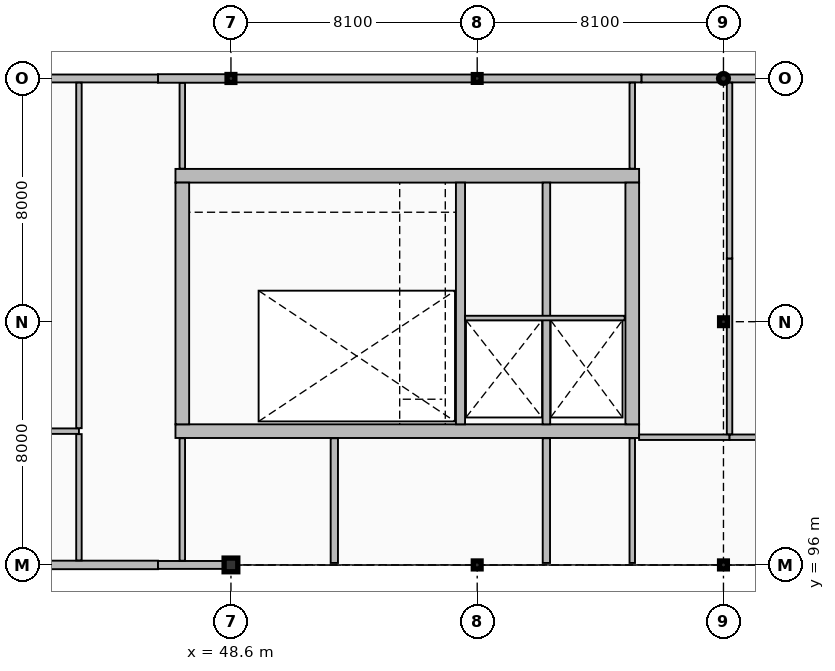
"""IFC4 building model, lengths in metres.
Left out: names, types, materials, properties, quantities, classifications, styles, units other than length and angle.
Written with IfcOpenShell. Run it as: python <this file> out.ifc"""

import sys

from ifc_helpers import new_model, si_unit, direction, frame, frame_2d, origin, origin_2d, place, context, subcontext, project, spatial, rectangle, hollow_rectangle, hollow_circle, i_section, extrude, element, fill, save


model = new_model("IFC4")
c1 = context("Model", 3, precision=1e-05, world=origin(), true_north=direction((0.0, 1.0)))
c2 = subcontext(c1, "Body", "Model", "MODEL_VIEW")
j1 = project(units=[si_unit("LENGTHUNIT", "METRE"), si_unit("PLANEANGLEUNIT", "RADIAN")], contexts=[c1])
p1 = place(None, origin())
s1 = spatial("IfcSite", under=j1, at=p1, CompositionType="ELEMENT")
p2 = place(p1, origin())
s2 = spatial("IfcBuilding", under=s1, at=p2, CompositionType="ELEMENT")
p3 = place(p2, frame((0.0, 0.0, 24.9)))
s3 = spatial("IfcBuildingStorey", under=s2, at=p3, CompositionType="ELEMENT", Elevation=24.9)
p4 = place(p3, frame((46.775, 100.4, 0.0), z_axis=(0.0, 0.0, 1.0), x_axis=(1.0, 0.0, 0.0)))
e1 = element("IfcWall", 1, at=p4, inside=s3, PredefinedType="SHEAR", context=c2, shape_type="SweptSolid", body=[
    extrude(rectangle(XDim=15.25, YDim=0.45, at=frame_2d((7.625, 0.0))), origin(), (0.0, 0.0, 1.0), 4.2),
])
p5 = place(p4, frame((0.975, 0.0, 0.0)))
e2 = element("IfcOpeningElement", 2, at=p5, cuts=e1, PredefinedType="OPENING", context=c2, shape_type="SweptSolid", body=[
    extrude(rectangle(XDim=1.15, YDim=2.25, at=frame_2d((0.575, 1.125))), frame((0.0, 0.235, 0.0), z_axis=(0.0, -1.0, 0.0), x_axis=(1.0, 0.0, 0.0)), (0.0, 0.0, 1.0), 0.47),
])
p6 = place(p4, frame((10.258, 0.0, 0.0)))
e3 = element("IfcOpeningElement", 3, at=p6, cuts=e1, PredefinedType="OPENING", context=c2, shape_type="SweptSolid", body=[
    extrude(rectangle(XDim=1.1, YDim=2.2, at=frame_2d((0.55, 1.1))), frame((0.0, 0.235, 0.0), z_axis=(0.0, -1.0, 0.0), x_axis=(1.0, 0.0, 0.0)), (0.0, 0.0, 1.0), 0.47),
])
p7 = place(p4, frame((12.972, 0.0, 0.0)))
e4 = element("IfcOpeningElement", 4, at=p7, cuts=e1, PredefinedType="OPENING", context=c2, shape_type="SweptSolid", body=[
    extrude(rectangle(XDim=1.1, YDim=2.2, at=frame_2d((0.55, 1.1))), frame((0.0, 0.235, 0.0), z_axis=(0.0, -1.0, 0.0), x_axis=(1.0, 0.0, 0.0)), (0.0, 0.0, 1.0), 0.47),
])
p8 = place(p3, frame((46.775, 108.8, 0.0), z_axis=(0.0, 0.0, 1.0), x_axis=(1.0, 0.0, 0.0)))
e5 = element("IfcWall", 5, at=p8, inside=s3, PredefinedType="SHEAR", context=c2, shape_type="SweptSolid", body=[
    extrude(rectangle(XDim=15.25, YDim=0.45, at=frame_2d((7.625, 0.0))), origin(), (0.0, 0.0, 1.0), 4.2),
])
for number, where, z_axis, x_axis in (
    (6, (47.0, 100.625, 0.0), (0.0, 0.0, 1.0), (0.0, 1.0, 0.0)),
    (7, (61.8, 100.625, 0.0), (0.0, 0.0, 1.0), (0.0, 1.0, 0.0)),
):
    element("IfcWall", number, at=place(p3, frame(where, z_axis=z_axis, x_axis=x_axis)), inside=s3, PredefinedType="SHEAR", context=c2, shape_type="SweptSolid", body=[
        extrude(rectangle(XDim=7.95, YDim=0.45, at=frame_2d((3.975, 0.0))), origin(), (0.0, 0.0, 1.0), 4.2),
    ])
p9 = place(p3, frame((56.15, 100.625, 0.0), z_axis=(0.0, 0.0, 1.0), x_axis=(0.0, 1.0, 0.0)))
e8 = element("IfcWall", 8, at=p9, inside=s3, PredefinedType="SHEAR", context=c2, shape_type="SweptSolid", body=[
    extrude(rectangle(XDim=7.95, YDim=0.3, at=frame_2d((3.975, 0.0))), origin(), (0.0, 0.0, 1.0), 4.2),
])
p10 = place(p3, frame((58.975, 100.625, 0.0), z_axis=(0.0, 0.0, 1.0), x_axis=(0.0, 1.0, 0.0)))
e9 = element("IfcWall", 9, at=p10, inside=s3, PredefinedType="SHEAR", context=c2, shape_type="SweptSolid", body=[
    extrude(rectangle(XDim=7.95, YDim=0.25, at=frame_2d((3.975, 0.0))), origin(), (0.0, 0.0, 1.0), 4.2),
])
p11 = place(p3, frame((48.6, 96.0, 0.0), z_axis=(0.0, 0.0, 1.0), x_axis=(1.0, 0.0, 0.0)))
e10 = element("IfcColumn", 10, at=p11, inside=s3, PredefinedType="COLUMN", context=c2, shape_type="SweptSolid", body=[
    extrude(rectangle(XDim=0.45, YDim=0.45, at=origin_2d()), origin(), (0.0, 0.0, 1.0), 4.2),
])
for number, where, z_axis, x_axis in (
    (11, (48.6, 112.0, 0.0), (0.0, 0.0, 1.0), (1.0, 0.0, 0.0)),
    (12, (56.7, 96.0, 0.0), (0.0, 0.0, 1.0), (1.0, 0.0, 0.0)),
):
    element("IfcColumn", number, at=place(p3, frame(where, z_axis=z_axis, x_axis=x_axis)), inside=s3, PredefinedType="COLUMN", context=c2, shape_type="SweptSolid", body=[
        extrude(i_section(OverallWidth=0.256, OverallDepth=0.26, WebThickness=0.011, FlangeThickness=0.017, FilletRadius=0.013, at=origin_2d()), origin(), (0.0, 0.0, 1.0), 4.2),
    ])
p12 = place(p3, frame((56.7, 112.0, 0.0), z_axis=(0.0, 0.0, 1.0), x_axis=(1.0, 0.0, 0.0)))
e13 = element("IfcColumn", 13, at=p12, inside=s3, PredefinedType="COLUMN", context=c2, shape_type="SweptSolid", body=[
    extrude(hollow_rectangle(XDim=0.254, YDim=0.254, WallThickness=0.013, InnerFilletRadius=0.013, OuterFilletRadius=0.025, at=origin_2d()), origin(), (0.0, 0.0, 1.0), 4.2),
])
p13 = place(p3, frame((64.8, 96.0, 0.0), z_axis=(0.0, 0.0, 1.0), x_axis=(1.0, 0.0, 0.0)))
e14 = element("IfcColumn", 14, at=p13, inside=s3, PredefinedType="COLUMN", context=c2, shape_type="SweptSolid", body=[
    extrude(i_section(OverallWidth=0.256, OverallDepth=0.26, WebThickness=0.011, FlangeThickness=0.017, FilletRadius=0.013, at=origin_2d()), origin(), (0.0, 0.0, 1.0), 4.2),
])
p14 = place(p3, frame((64.8, 104.0, 0.0), z_axis=(0.0, 0.0, 1.0), x_axis=(1.0, 0.0, 0.0)))
e15 = element("IfcColumn", 15, at=p14, inside=s3, PredefinedType="COLUMN", context=c2, shape_type="SweptSolid", body=[
    extrude(hollow_rectangle(XDim=0.254, YDim=0.254, WallThickness=0.013, InnerFilletRadius=0.013, OuterFilletRadius=0.025, at=origin_2d()), origin(), (0.0, 0.0, 1.0), 4.2),
])
p15 = place(p3, frame((64.8, 112.0, 0.0), z_axis=(0.0, 0.0, 1.0), x_axis=(1.0, 0.0, 0.0)))
e16 = element("IfcColumn", 16, at=p15, inside=s3, PredefinedType="COLUMN", context=c2, shape_type="SweptSolid", body=[
    extrude(hollow_circle(Radius=0.162, WallThickness=0.013, at=origin_2d()), origin(), (0.0, 0.0, 1.0), 4.2),
])
p16 = place(p3, frame((40.68, 96.0, 0.0), z_axis=(0.0, 0.0, 1.0), x_axis=(1.0, 0.0, 0.0)))
e17 = element("IfcWall", 17, at=p16, inside=s3, PredefinedType="SOLIDWALL", context=c2, shape_type="SweptSolid", body=[
    extrude(rectangle(XDim=5.52, YDim=0.28, at=frame_2d((2.76, 0.0))), origin(), (0.0, 0.0, 1.0), 3.402),
])
p17 = place(p3, frame((46.2, 96.0, 0.0), z_axis=(0.0, 0.0, 1.0), x_axis=(1.0, 0.0, 0.0)))
e18 = element("IfcWall", 18, at=p17, inside=s3, PredefinedType="SOLIDWALL", context=c2, shape_type="SweptSolid", body=[
    extrude(rectangle(XDim=2.22, YDim=0.26, at=frame_2d((1.11, 0.0))), origin(), (0.0, 0.0, 1.0), 3.402),
])
p18 = place(p3, frame((75.6, 112.0, 0.0), z_axis=(0.0, 0.0, 1.0), x_axis=(-1.0, 0.0, 0.0)))
e19 = element("IfcWall", 19, at=p18, inside=s3, PredefinedType="SOLIDWALL", context=c2, shape_type="SweptSolid", body=[
    extrude(rectangle(XDim=13.5, YDim=0.26, at=frame_2d((6.75, 0.0))), origin(), (0.0, 0.0, 1.0), 3.302),
])
p19 = place(p18, frame((5.4, 0.0, 0.95)))
e20 = element("IfcOpeningElement", 20, at=p19, cuts=e19, PredefinedType="OPENING", context=c2, shape_type="SweptSolid", body=[
    extrude(rectangle(XDim=3.15, YDim=1.6, at=frame_2d((1.575, 0.8))), frame((0.0, 0.14, 0.0), z_axis=(0.0, -1.0, 0.0), x_axis=(1.0, 0.0, 0.0)), (0.0, 0.0, 1.0), 0.28),
])
p20 = place(p3, frame((62.1, 112.0, 0.0), z_axis=(0.0, 0.0, 1.0), x_axis=(-1.0, 0.0, 0.0)))
e21 = element("IfcWall", 21, at=p20, inside=s3, PredefinedType="SOLIDWALL", context=c2, shape_type="SweptSolid", body=[
    extrude(rectangle(XDim=13.5, YDim=0.26, at=frame_2d((6.75, 0.0))), origin(), (0.0, 0.0, 1.0), 3.402),
])
p21 = place(p20, frame((7.2, 0.0, 0.95)))
e22 = element("IfcOpeningElement", 22, at=p21, cuts=e21, PredefinedType="OPENING", context=c2, shape_type="SweptSolid", body=[
    extrude(rectangle(XDim=3.6, YDim=1.8, at=frame_2d((1.8, 0.9))), frame((0.0, 0.14, 0.0), z_axis=(0.0, -1.0, 0.0), x_axis=(1.0, 0.0, 0.0)), (0.0, 0.0, 1.0), 0.28),
])
p22 = place(p3, frame((48.6, 112.0, 0.0), z_axis=(0.0, 0.0, 1.0), x_axis=(-1.0, 0.0, 0.0)))
e23 = element("IfcWall", 23, at=p22, inside=s3, PredefinedType="SOLIDWALL", context=c2, shape_type="SweptSolid", body=[
    extrude(rectangle(XDim=2.4, YDim=0.28, at=frame_2d((1.2, 0.0))), origin(), (0.0, 0.0, 1.0), 3.489),
])
p23 = place(p3, frame((46.2, 112.0, 0.0), z_axis=(0.0, 0.0, 1.0), x_axis=(-1.0, 0.0, 0.0)))
e24 = element("IfcWall", 24, at=p23, inside=s3, PredefinedType="SOLIDWALL", context=c2, shape_type="SweptSolid", body=[
    extrude(rectangle(XDim=5.7, YDim=0.26, at=frame_2d((2.85, 0.0))), origin(), (0.0, 0.0, 1.0), 3.489),
])
p24 = place(p23, frame((3.6, 0.0, 0.95)))
e25 = element("IfcOpeningElement", 25, at=p24, cuts=e24, PredefinedType="OPENING", context=c2, shape_type="SweptSolid", body=[
    extrude(rectangle(XDim=0.6, YDim=1.8, at=frame_2d((0.3, 0.9))), frame((0.0, 0.14, 0.0), z_axis=(0.0, -1.0, 0.0), x_axis=(1.0, 0.0, 0.0)), (0.0, 0.0, 1.0), 0.28),
])
p25 = place(p3, frame((56.3, 104.12, 0.0), z_axis=(0.0, 0.0, 1.0), x_axis=(1.0, 0.0, 0.0)))
e26 = element("IfcWall", 26, at=p25, inside=s3, PredefinedType="PARTITIONING", context=c2, shape_type="SweptSolid", body=[
    extrude(rectangle(XDim=5.25, YDim=0.15, at=frame_2d((2.625, 0.0))), origin(), (0.0, 0.0, 1.0), 3.96),
])
p26 = place(p3, frame((39.6, 100.4, 0.0), z_axis=(0.0, 0.0, 1.0), x_axis=(1.0, 0.0, 0.0)))
e27 = element("IfcWall", 27, at=p26, inside=s3, PredefinedType="PARTITIONING", context=c2, shape_type="SweptSolid", body=[
    extrude(rectangle(XDim=4.0, YDim=0.18, at=frame_2d((2.0, 0.0))), origin(), (0.0, 0.0, 1.0), 3.96),
])
p27 = place(p3, frame((62.025, 100.2, 0.0), z_axis=(0.0, 0.0, 1.0), x_axis=(1.0, 0.0, 0.0)))
e28 = element("IfcWall", 28, at=p27, inside=s3, PredefinedType="PARTITIONING", context=c2, shape_type="SweptSolid", body=[
    extrude(rectangle(XDim=2.975, YDim=0.18, at=frame_2d((1.488, 0.0))), origin(), (0.0, 0.0, 1.0), 3.96),
])
p28 = place(p27, frame((0.887, 0.0, 0.0)))
e29 = element("IfcOpeningElement", 29, at=p28, cuts=e28, PredefinedType="OPENING", context=c2, shape_type="SweptSolid", body=[
    extrude(rectangle(XDim=1.2, YDim=2.2, at=frame_2d((0.6, 1.1))), frame((0.0, 0.1, 0.0), z_axis=(0.0, -1.0, 0.0), x_axis=(1.0, 0.0, 0.0)), (0.0, 0.0, 1.0), 0.2),
])
p29 = place(p3, frame((65.0, 100.2, 0.0), z_axis=(0.0, 0.0, 1.0), x_axis=(1.0, 0.0, 0.0)))
e30 = element("IfcWall", 30, at=p29, inside=s3, PredefinedType="PARTITIONING", context=c2, shape_type="SweptSolid", body=[
    extrude(rectangle(XDim=7.1, YDim=0.18, at=frame_2d((3.55, 0.0))), origin(), (0.0, 0.0, 1.0), 3.96),
])
p30 = place(p29, frame((3.0, 0.0, 0.0)))
e31 = element("IfcOpeningElement", 31, at=p30, cuts=e30, PredefinedType="OPENING", context=c2, shape_type="SweptSolid", body=[
    extrude(rectangle(XDim=1.1, YDim=2.3, at=frame_2d((0.55, 1.15))), frame((0.0, 0.1, 0.0), z_axis=(0.0, -1.0, 0.0), x_axis=(1.0, 0.0, 0.0)), (0.0, 0.0, 1.0), 0.2),
])
p31 = place(p3, frame((43.6, 96.148, 0.0), z_axis=(0.0, 0.0, 1.0), x_axis=(0.0, 1.0, 0.0)))
e32 = element("IfcWall", 32, at=p31, inside=s3, PredefinedType="PARTITIONING", context=c2, shape_type="SweptSolid", body=[
    extrude(rectangle(XDim=4.154, YDim=0.18, at=frame_2d((2.077, 0.0))), origin(), (0.0, 0.0, 1.0), 3.96),
])
p32 = place(p31, frame((1.527, 0.0, 0.0)))
e33 = element("IfcOpeningElement", 33, at=p32, cuts=e32, PredefinedType="OPENING", context=c2, shape_type="SweptSolid", body=[
    extrude(rectangle(XDim=1.1, YDim=2.2, at=frame_2d((0.55, 1.1))), frame((0.0, 0.1, 0.0), z_axis=(0.0, -1.0, 0.0), x_axis=(1.0, 0.0, 0.0)), (0.0, 0.0, 1.0), 0.2),
])
p33 = place(p3, frame((43.6, 100.498, 0.0), z_axis=(0.0, 0.0, 1.0), x_axis=(0.0, 1.0, 0.0)))
e34 = element("IfcWall", 34, at=p33, inside=s3, PredefinedType="PARTITIONING", context=c2, shape_type="SweptSolid", body=[
    extrude(rectangle(XDim=11.364, YDim=0.18, at=frame_2d((5.682, 0.0))), origin(), (0.0, 0.0, 1.0), 3.96),
])
p34 = place(p33, frame((5.182, 0.0, 0.0)))
e35 = element("IfcOpeningElement", 35, at=p34, cuts=e34, PredefinedType="OPENING", context=c2, shape_type="SweptSolid", body=[
    extrude(rectangle(XDim=1.0, YDim=2.2, at=frame_2d((0.5, 1.1))), frame((0.0, 0.1, 0.0), z_axis=(0.0, -1.0, 0.0), x_axis=(1.0, 0.0, 0.0)), (0.0, 0.0, 1.0), 0.2),
])
p35 = place(p3, frame((47.0, 96.138, 0.0), z_axis=(0.0, 0.0, 1.0), x_axis=(0.0, 1.0, 0.0)))
e36 = element("IfcWall", 36, at=p35, inside=s3, PredefinedType="PARTITIONING", context=c2, shape_type="SweptSolid", body=[
    extrude(rectangle(XDim=4.029, YDim=0.18, at=frame_2d((2.015, 0.0))), origin(), (0.0, 0.0, 1.0), 3.96),
])
p36 = place(p35, frame((1.465, 0.0, 0.0)))
e37 = element("IfcOpeningElement", 37, at=p36, cuts=e36, PredefinedType="OPENING", context=c2, shape_type="SweptSolid", body=[
    extrude(rectangle(XDim=1.1, YDim=2.2, at=frame_2d((0.55, 1.1))), frame((0.0, 0.1, 0.0), z_axis=(0.0, -1.0, 0.0), x_axis=(1.0, 0.0, 0.0)), (0.0, 0.0, 1.0), 0.2),
])
p37 = place(p3, frame((47.0, 109.033, 0.0), z_axis=(0.0, 0.0, 1.0), x_axis=(0.0, 1.0, 0.0)))
e38 = element("IfcWall", 38, at=p37, inside=s3, PredefinedType="PARTITIONING", context=c2, shape_type="SweptSolid", body=[
    extrude(rectangle(XDim=2.819, YDim=0.18, at=frame_2d((1.41, 0.0))), origin(), (0.0, 0.0, 1.0), 3.96),
])
p38 = place(p37, frame((0.86, 0.0, 0.0)))
e39 = element("IfcOpeningElement", 39, at=p38, cuts=e38, PredefinedType="OPENING", context=c2, shape_type="SweptSolid", body=[
    extrude(rectangle(XDim=1.1, YDim=2.2, at=frame_2d((0.55, 1.1))), frame((0.0, 0.1, 0.0), z_axis=(0.0, -1.0, 0.0), x_axis=(1.0, 0.0, 0.0)), (0.0, 0.0, 1.0), 0.2),
])
p39 = place(p3, frame((52.0, 96.065, 0.0), z_axis=(0.0, 0.0, 1.0), x_axis=(0.0, 1.0, 0.0)))
e40 = element("IfcWall", 40, at=p39, inside=s3, PredefinedType="PARTITIONING", context=c2, shape_type="SweptSolid", body=[
    extrude(rectangle(XDim=4.102, YDim=0.24, at=frame_2d((2.051, 0.0))), origin(), (0.0, 0.0, 1.0), 3.96),
])
p40 = place(p39, frame((1.451, 0.0, 0.0)))
e41 = element("IfcOpeningElement", 41, at=p40, cuts=e40, PredefinedType="OPENING", context=c2, shape_type="SweptSolid", body=[
    extrude(rectangle(XDim=1.2, YDim=2.3, at=frame_2d((0.6, 1.15))), frame((0.0, 0.13, 0.0), z_axis=(0.0, -1.0, 0.0), x_axis=(1.0, 0.0, 0.0)), (0.0, 0.0, 1.0), 0.26),
])
p41 = place(p3, frame((58.975, 96.065, 0.0), z_axis=(0.0, 0.0, 1.0), x_axis=(0.0, 1.0, 0.0)))
e42 = element("IfcWall", 42, at=p41, inside=s3, PredefinedType="PARTITIONING", context=c2, shape_type="SweptSolid", body=[
    extrude(rectangle(XDim=4.102, YDim=0.24, at=frame_2d((2.051, 0.0))), origin(), (0.0, 0.0, 1.0), 3.96),
])
p42 = place(p3, frame((61.8, 96.065, 0.0), z_axis=(0.0, 0.0, 1.0), x_axis=(0.0, 1.0, 0.0)))
e43 = element("IfcWall", 43, at=p42, inside=s3, PredefinedType="PARTITIONING", context=c2, shape_type="SweptSolid", body=[
    extrude(rectangle(XDim=4.102, YDim=0.18, at=frame_2d((2.051, 0.0))), origin(), (0.0, 0.0, 1.0), 3.96),
])
p43 = place(p42, frame((1.501, 0.0, 0.0)))
e44 = element("IfcOpeningElement", 44, at=p43, cuts=e43, PredefinedType="OPENING", context=c2, shape_type="SweptSolid", body=[
    extrude(rectangle(XDim=1.1, YDim=2.2, at=frame_2d((0.55, 1.1))), frame((0.0, 0.1, 0.0), z_axis=(0.0, -1.0, 0.0), x_axis=(1.0, 0.0, 0.0)), (0.0, 0.0, 1.0), 0.2),
])
p44 = place(p3, frame((61.8, 109.033, 0.0), z_axis=(0.0, 0.0, 1.0), x_axis=(0.0, 1.0, 0.0)))
e45 = element("IfcWall", 45, at=p44, inside=s3, PredefinedType="PARTITIONING", context=c2, shape_type="SweptSolid", body=[
    extrude(rectangle(XDim=2.829, YDim=0.18, at=frame_2d((1.415, 0.0))), origin(), (0.0, 0.0, 1.0), 3.96),
])
p45 = place(p44, frame((0.865, 0.0, 0.0)))
e46 = element("IfcOpeningElement", 46, at=p45, cuts=e45, PredefinedType="OPENING", context=c2, shape_type="SweptSolid", body=[
    extrude(rectangle(XDim=1.1, YDim=2.2, at=frame_2d((0.55, 1.1))), frame((0.0, 0.1, 0.0), z_axis=(0.0, -1.0, 0.0), x_axis=(1.0, 0.0, 0.0)), (0.0, 0.0, 1.0), 0.2),
])
for number, where, z_axis, x_axis in (
    (47, (65.0, 100.298, 0.0), (0.0, 0.0, 1.0), (0.0, 1.0, 0.0)),
    (48, (65.0, 106.08, 0.0), (0.0, 0.0, 1.0), (0.0, 1.0, 0.0)),
):
    element("IfcWall", number, at=place(p3, frame(where, z_axis=z_axis, x_axis=x_axis)), inside=s3, PredefinedType="PARTITIONING", context=c2, shape_type="SweptSolid", body=[
        extrude(rectangle(XDim=5.782, YDim=0.18, at=frame_2d((2.891, 0.0))), origin(), (0.0, 0.0, 1.0), 3.452),
    ])
p46 = place(p21, origin())
e49 = element("IfcWindow", 49, at=p46, inside=s3, PartitioningType="TRIPLE_PANEL_VERTICAL", PredefinedType="WINDOW", context=c2, shape_type="SweptSolid", body=[
    extrude(rectangle(XDim=3.6, YDim=1.8, at=frame_2d((1.8, 0.9))), frame((0.0, 0.03, 0.0), z_axis=(0.0, -1.0, 0.0), x_axis=(1.0, 0.0, 0.0)), (0.0, 0.0, 1.0), 0.06),
])
fill(e22, e49)
p47 = place(p5, origin())
e50 = element("IfcDoor", 50, at=p47, inside=s3, OperationType="SINGLE_SWING_LEFT", PredefinedType="DOOR", context=c2, shape_type="SweptSolid", body=[
    extrude(rectangle(XDim=1.15, YDim=2.25, at=frame_2d((0.575, 1.125))), frame((0.0, 0.025, 0.0), z_axis=(0.0, -1.0, 0.0), x_axis=(1.0, 0.0, 0.0)), (0.0, 0.0, 1.0), 0.05),
])
fill(e2, e50)
p48 = place(p6, frame((1.1, 0.0, 0.0), z_axis=(0.0, 0.0, 1.0), x_axis=(-1.0, 0.0, 0.0)))
e51 = element("IfcDoor", 51, at=p48, inside=s3, OperationType="DOUBLE_DOOR_SLIDING", PredefinedType="DOOR", context=c2, shape_type="SweptSolid", body=[
    extrude(rectangle(XDim=1.1, YDim=2.2, at=frame_2d((0.55, 1.1))), frame((0.0, 0.025, 0.0), z_axis=(0.0, -1.0, 0.0), x_axis=(1.0, 0.0, 0.0)), (0.0, 0.0, 1.0), 0.05),
])
fill(e3, e51)
p49 = place(p7, frame((1.1, 0.0, 0.0), z_axis=(0.0, 0.0, 1.0), x_axis=(-1.0, 0.0, 0.0)))
e52 = element("IfcDoor", 52, at=p49, inside=s3, OperationType="DOUBLE_DOOR_SLIDING", PredefinedType="DOOR", context=c2, shape_type="SweptSolid", body=[
    extrude(rectangle(XDim=1.1, YDim=2.2, at=frame_2d((0.55, 1.1))), frame((0.0, 0.025, 0.0), z_axis=(0.0, -1.0, 0.0), x_axis=(1.0, 0.0, 0.0)), (0.0, 0.0, 1.0), 0.05),
])
fill(e4, e52)
p50 = place(p28, frame((1.2, 0.0, 0.0), z_axis=(0.0, 0.0, 1.0), x_axis=(-1.0, 0.0, 0.0)))
e53 = element("IfcDoor", 53, at=p50, inside=s3, OperationType="SINGLE_SWING_RIGHT", PredefinedType="DOOR", context=c2, shape_type="SweptSolid", body=[
    extrude(rectangle(XDim=1.2, YDim=2.2, at=frame_2d((0.6, 1.1))), frame((0.0, 0.025, 0.0), z_axis=(0.0, -1.0, 0.0), x_axis=(1.0, 0.0, 0.0)), (0.0, 0.0, 1.0), 0.05),
])
fill(e29, e53)
p51 = place(p32, origin())
e54 = element("IfcDoor", 54, at=p51, inside=s3, OperationType="SINGLE_SWING_RIGHT", PredefinedType="DOOR", context=c2, shape_type="SweptSolid", body=[
    extrude(rectangle(XDim=1.1, YDim=2.2, at=frame_2d((0.55, 1.1))), frame((0.0, 0.025, 0.0), z_axis=(0.0, -1.0, 0.0), x_axis=(1.0, 0.0, 0.0)), (0.0, 0.0, 1.0), 0.05),
])
fill(e33, e54)
p52 = place(p34, origin())
e55 = element("IfcDoor", 55, at=p52, inside=s3, OperationType="SINGLE_SWING_LEFT", PredefinedType="DOOR", context=c2, shape_type="SweptSolid", body=[
    extrude(rectangle(XDim=1.0, YDim=2.2, at=frame_2d((0.5, 1.1))), frame((0.0, 0.025, 0.0), z_axis=(0.0, -1.0, 0.0), x_axis=(1.0, 0.0, 0.0)), (0.0, 0.0, 1.0), 0.05),
])
fill(e35, e55)
p53 = place(p36, origin())
e56 = element("IfcDoor", 56, at=p53, inside=s3, OperationType="SINGLE_SWING_RIGHT", PredefinedType="DOOR", context=c2, shape_type="SweptSolid", body=[
    extrude(rectangle(XDim=1.1, YDim=2.2, at=frame_2d((0.55, 1.1))), frame((0.0, 0.025, 0.0), z_axis=(0.0, -1.0, 0.0), x_axis=(1.0, 0.0, 0.0)), (0.0, 0.0, 1.0), 0.05),
])
fill(e37, e56)
p54 = place(p38, frame((1.1, 0.0, 0.0), z_axis=(0.0, 0.0, 1.0), x_axis=(-1.0, 0.0, 0.0)))
e57 = element("IfcDoor", 57, at=p54, inside=s3, OperationType="SINGLE_SWING_LEFT", PredefinedType="DOOR", context=c2, shape_type="SweptSolid", body=[
    extrude(rectangle(XDim=1.1, YDim=2.2, at=frame_2d((0.55, 1.1))), frame((0.0, 0.025, 0.0), z_axis=(0.0, -1.0, 0.0), x_axis=(1.0, 0.0, 0.0)), (0.0, 0.0, 1.0), 0.05),
])
fill(e39, e57)
p55 = place(p40, origin())
e58 = element("IfcDoor", 58, at=p55, inside=s3, OperationType="SINGLE_SWING_RIGHT", PredefinedType="DOOR", context=c2, shape_type="SweptSolid", body=[
    extrude(rectangle(XDim=1.2, YDim=2.3, at=frame_2d((0.6, 1.15))), frame((0.0, 0.025, 0.0), z_axis=(0.0, -1.0, 0.0), x_axis=(1.0, 0.0, 0.0)), (0.0, 0.0, 1.0), 0.05),
])
fill(e41, e58)
p56 = place(p43, frame((1.1, 0.0, 0.0), z_axis=(0.0, 0.0, 1.0), x_axis=(-1.0, 0.0, 0.0)))
e59 = element("IfcDoor", 59, at=p56, inside=s3, OperationType="SINGLE_SWING_LEFT", PredefinedType="DOOR", context=c2, shape_type="SweptSolid", body=[
    extrude(rectangle(XDim=1.1, YDim=2.2, at=frame_2d((0.55, 1.1))), frame((0.0, 0.025, 0.0), z_axis=(0.0, -1.0, 0.0), x_axis=(1.0, 0.0, 0.0)), (0.0, 0.0, 1.0), 0.05),
])
fill(e44, e59)
p57 = place(p45, origin())
e60 = element("IfcDoor", 60, at=p57, inside=s3, OperationType="SINGLE_SWING_RIGHT", PredefinedType="DOOR", context=c2, shape_type="SweptSolid", body=[
    extrude(rectangle(XDim=1.1, YDim=2.2, at=frame_2d((0.55, 1.1))), frame((0.0, 0.025, 0.0), z_axis=(0.0, -1.0, 0.0), x_axis=(1.0, 0.0, 0.0)), (0.0, 0.0, 1.0), 0.05),
])
fill(e46, e60)
save(model, sys.argv[1])
